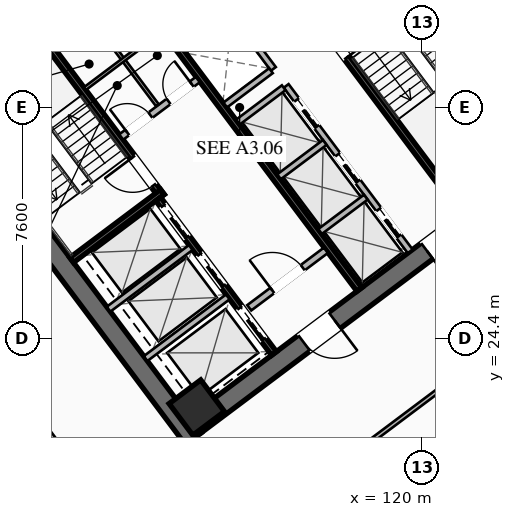
"""IFC4 building model, lengths in metres.
Left out: names, types, materials, properties, quantities, classifications, styles, units other than length and angle.
Written with IfcOpenShell. Run it as: python <this file> out.ifc"""

import sys

from ifc_helpers import new_model, si_unit, direction, frame, frame_2d, origin, origin_2d, place, context, subcontext, project, spatial, rectangle, hollow_rectangle, extrude, element, fill, save


model = new_model("IFC4")
c1 = context("Model", 3, precision=1e-05, world=origin(), true_north=direction((0.0, 1.0)))
c2 = subcontext(c1, "Body", "Model", "MODEL_VIEW")
j1 = project(units=[si_unit("LENGTHUNIT", "METRE"), si_unit("PLANEANGLEUNIT", "RADIAN")], contexts=[c1])
p1 = place(None, origin())
s1 = spatial("IfcSite", under=j1, at=p1, CompositionType="ELEMENT")
p2 = place(p1, origin())
s2 = spatial("IfcBuilding", under=s1, at=p2, CompositionType="ELEMENT")
p3 = place(p2, frame((0.0, 0.0, 102.7)))
s3 = spatial("IfcBuildingStorey", under=s2, at=p3, CompositionType="ELEMENT", Elevation=102.7)
for number, where, z_axis, x_axis in (
    (1, (112.476, 21.107, 0.0), (0.0, 0.0, 1.0), (-0.6, 0.8, 0.0)),
    (2, (115.524, 42.893, 0.0), (0.0, 0.0, 1.0), (0.6, -0.8, 0.0)),
):
    element("IfcWall", number, at=place(p3, frame(where, z_axis=z_axis, x_axis=x_axis)), inside=s3, PredefinedType="SHEAR", context=c2, shape_type="SweptSolid", body=[
        extrude(rectangle(XDim=15.6, YDim=0.65, at=frame_2d((7.8, 0.0))), origin(), (0.0, 0.0, 1.0), 3.55),
    ])
p4 = place(p3, frame((124.429, 30.478, 0.0), z_axis=(0.0, 0.0, 1.0), x_axis=(-0.799998028465, -0.600002628705, 0.0)))
e3 = element("IfcWall", 3, at=p4, inside=s3, PredefinedType="SHEAR", context=c2, shape_type="SweptSolid", body=[
    extrude(rectangle(XDim=14.86, YDim=0.65, at=frame_2d((7.43, 0.0))), origin(), (0.0, 0.0, 1.0), 3.55),
])
p5 = place(p4, frame((9.13, 0.0, 0.0)))
e4 = element("IfcOpeningElement", 4, at=p5, cuts=e3, PredefinedType="OPENING", context=c2, shape_type="SweptSolid", body=[
    extrude(rectangle(XDim=1.25, YDim=2.25, at=frame_2d((0.625, 1.125))), frame((0.0, 0.335, 0.0), z_axis=(0.0, -1.0, 0.0), x_axis=(1.0, 0.0, 0.0)), (0.0, 0.0, 1.0), 0.67),
])
p6 = place(p4, frame((4.08, 0.0, 0.0)))
e5 = element("IfcOpeningElement", 5, at=p6, cuts=e3, PredefinedType="OPENING", context=c2, shape_type="SweptSolid", body=[
    extrude(rectangle(XDim=1.25, YDim=2.25, at=frame_2d((0.625, 1.125))), frame((0.0, 0.335, 0.0), z_axis=(0.0, -1.0, 0.0), x_axis=(1.0, 0.0, 0.0)), (0.0, 0.0, 1.0), 0.67),
])
p7 = place(p3, frame((103.571, 33.522, 0.0), z_axis=(0.0, 0.0, 1.0), x_axis=(0.799998028465, 0.600002628705, 0.0)))
e6 = element("IfcWall", 6, at=p7, inside=s3, PredefinedType="SHEAR", context=c2, shape_type="SweptSolid", body=[
    extrude(rectangle(XDim=14.86, YDim=0.65, at=frame_2d((7.43, 0.0))), origin(), (0.0, 0.0, 1.0), 3.55),
])
p8 = place(p7, frame((4.48, 0.0, 0.0)))
e7 = element("IfcOpeningElement", 7, at=p8, cuts=e6, PredefinedType="OPENING", context=c2, shape_type="SweptSolid", body=[
    extrude(rectangle(XDim=1.25, YDim=2.25, at=frame_2d((0.625, 1.125))), frame((0.0, 0.335, 0.0), z_axis=(0.0, -1.0, 0.0), x_axis=(1.0, 0.0, 0.0)), (0.0, 0.0, 1.0), 0.67),
])
p9 = place(p7, frame((9.53, 0.0, 0.0)))
e8 = element("IfcOpeningElement", 8, at=p9, cuts=e6, PredefinedType="OPENING", context=c2, shape_type="SweptSolid", body=[
    extrude(rectangle(XDim=1.25, YDim=2.25, at=frame_2d((0.625, 1.125))), frame((0.0, 0.335, 0.0), z_axis=(0.0, -1.0, 0.0), x_axis=(1.0, 0.0, 0.0)), (0.0, 0.0, 1.0), 0.67),
])
p10 = place(p3, frame((112.59, 22.13, 0.0), z_axis=(0.0, 0.0, 1.0), x_axis=(0.799999996291, 0.600000004945, 0.0)))
e9 = element("IfcColumn", 9, at=p10, inside=s3, PredefinedType="COLUMN", context=c2, shape_type="SweptSolid", body=[
    extrude(hollow_rectangle(XDim=1.3, YDim=1.3, WallThickness=0.05, at=origin_2d()), origin(), (0.0, 0.0, 1.0), 3.35),
])
p11 = place(p3, frame((111.44, 29.08, 0.0), z_axis=(0.0, 0.0, 1.0), x_axis=(-0.600009827119, 0.799992629566, 0.0)))
e10 = element("IfcWall", 10, at=p11, inside=s3, PredefinedType="SHEAR", context=c2, shape_type="SweptSolid", body=[
    extrude(rectangle(XDim=7.95, YDim=0.2, at=frame_2d((3.975, 0.0))), origin(), (0.0, 0.0, 1.0), 3.35),
])
p12 = place(p11, frame((0.45, 0.0, 0.0)))
e11 = element("IfcOpeningElement", 11, at=p12, cuts=e10, PredefinedType="OPENING", context=c2, shape_type="SweptSolid", body=[
    extrude(rectangle(XDim=1.15, YDim=2.2, at=frame_2d((0.575, 1.1))), frame((0.0, 0.11, 0.0), z_axis=(0.0, -1.0, 0.0), x_axis=(1.0, 0.0, 0.0)), (0.0, 0.0, 1.0), 0.22),
])
p13 = place(p3, frame((108.476, 26.982, 0.0), z_axis=(0.0, 0.0, 1.0), x_axis=(0.799984290658, 0.600020945218, 0.0)))
e12 = element("IfcWall", 12, at=p13, inside=s3, PredefinedType="SHEAR", context=c2, shape_type="SweptSolid", body=[
    extrude(rectangle(XDim=3.73, YDim=0.2, at=frame_2d((1.865, 0.0))), origin(), (0.0, 0.0, 1.0), 3.35),
])
p14 = place(p3, frame((116.56, 34.92, 0.0), z_axis=(0.0, 0.0, 1.0), x_axis=(0.600009827119, -0.799992629566, 0.0)))
e13 = element("IfcWall", 13, at=p14, inside=s3, PredefinedType="SHEAR", context=c2, shape_type="SweptSolid", body=[
    extrude(rectangle(XDim=7.95, YDim=0.2, at=frame_2d((3.975, 0.0))), origin(), (0.0, 0.0, 1.0), 3.35),
])
p15 = place(p14, frame((0.45, 0.0, 0.0)))
e14 = element("IfcOpeningElement", 14, at=p15, cuts=e13, PredefinedType="OPENING", context=c2, shape_type="SweptSolid", body=[
    extrude(rectangle(XDim=1.15, YDim=2.2, at=frame_2d((0.575, 1.1))), frame((0.0, 0.11, 0.0), z_axis=(0.0, -1.0, 0.0), x_axis=(1.0, 0.0, 0.0)), (0.0, 0.0, 1.0), 0.22),
])
p16 = place(p3, frame((117.938, 26.016, 0.0), z_axis=(0.0, 0.0, 1.0), x_axis=(-0.600005463273, 0.799995902516, 0.0)))
e15 = element("IfcWall", 15, at=p16, inside=s3, PredefinedType="SHEAR", context=c2, shape_type="SweptSolid", body=[
    extrude(rectangle(XDim=14.3, YDim=0.2, at=frame_2d((7.15, 0.0))), origin(), (0.0, 0.0, 1.0), 3.35),
])
p17 = place(p3, frame((110.104, 31.028, 0.0), z_axis=(0.0, 0.0, 1.0), x_axis=(0.800018601094, 0.59997519774, 0.0)))
e16 = element("IfcWall", 16, at=p17, inside=s3, PredefinedType="SOLIDWALL", context=c2, shape_type="SweptSolid", body=[
    extrude(rectangle(XDim=3.15, YDim=0.22, at=frame_2d((1.575, 0.0))), origin(), (0.0, 0.0, 1.0), 2.703),
])
p18 = place(p17, frame((0.25, 0.0, 0.0)))
e17 = element("IfcOpeningElement", 17, at=p18, cuts=e16, PredefinedType="OPENING", context=c2, shape_type="SweptSolid", body=[
    extrude(rectangle(XDim=0.95, YDim=2.05, at=frame_2d((0.475, 1.025))), frame((0.0, 0.12, 0.0), z_axis=(0.0, -1.0, 0.0), x_axis=(1.0, 0.0, 0.0)), (0.0, 0.0, 1.0), 0.24),
])
p19 = place(p17, frame((1.95, 0.0, 0.0)))
e18 = element("IfcOpeningElement", 18, at=p19, cuts=e16, PredefinedType="OPENING", context=c2, shape_type="SweptSolid", body=[
    extrude(rectangle(XDim=0.95, YDim=2.05, at=frame_2d((0.475, 1.025))), frame((0.0, 0.12, 0.0), z_axis=(0.0, -1.0, 0.0), x_axis=(1.0, 0.0, 0.0)), (0.0, 0.0, 1.0), 0.24),
])
p20 = place(p3, frame((114.316, 25.412, 0.0), z_axis=(0.0, 0.0, 1.0), x_axis=(0.800018601094, 0.59997519774, 0.0)))
e19 = element("IfcWall", 19, at=p20, inside=s3, PredefinedType="SOLIDWALL", context=c2, shape_type="SweptSolid", body=[
    extrude(rectangle(XDim=3.15, YDim=0.22, at=frame_2d((1.575, 0.0))), origin(), (0.0, 0.0, 1.0), 2.703),
])
p21 = place(p20, frame((0.95, 0.0, 0.0)))
e20 = element("IfcOpeningElement", 20, at=p21, cuts=e19, PredefinedType="OPENING", context=c2, shape_type="SweptSolid", body=[
    extrude(rectangle(XDim=1.25, YDim=2.25, at=frame_2d((0.625, 1.125))), frame((0.0, 0.12, 0.0), z_axis=(0.0, -1.0, 0.0), x_axis=(1.0, 0.0, 0.0)), (0.0, 0.0, 1.0), 0.24),
])
p22 = place(p3, frame((115.13, 23.91, 0.0), z_axis=(0.0, 0.0, 1.0), x_axis=(-0.599975393228, 0.800018454488, 0.0)))
e21 = element("IfcWall", 21, at=p22, inside=s3, PredefinedType="SHEAR", context=c2, shape_type="SweptSolid", body=[
    extrude(rectangle(XDim=6.35, YDim=0.2, at=frame_2d((3.175, 0.0))), origin(), (0.0, 0.0, 1.0), 3.35),
])
p23 = place(p22, frame((4.775, 0.0, 0.0)))
e22 = element("IfcOpeningElement", 22, at=p23, cuts=e21, PredefinedType="OPENING", context=c2, shape_type="SweptSolid", body=[
    extrude(rectangle(XDim=1.3, YDim=2.25, at=frame_2d((0.65, 1.125))), frame((0.0, 0.11, 0.0), z_axis=(0.0, -1.0, 0.0), x_axis=(1.0, 0.0, 0.0)), (0.0, 0.0, 1.0), 0.22),
])
p24 = place(p22, frame((2.775, 0.0, 0.0)))
e23 = element("IfcOpeningElement", 23, at=p24, cuts=e21, PredefinedType="OPENING", context=c2, shape_type="SweptSolid", body=[
    extrude(rectangle(XDim=1.3, YDim=2.25, at=frame_2d((0.65, 1.125))), frame((0.0, 0.11, 0.0), z_axis=(0.0, -1.0, 0.0), x_axis=(1.0, 0.0, 0.0)), (0.0, 0.0, 1.0), 0.22),
])
p25 = place(p22, frame((0.575, 0.0, 0.0)))
e24 = element("IfcOpeningElement", 24, at=p25, cuts=e21, PredefinedType="OPENING", context=c2, shape_type="SweptSolid", body=[
    extrude(rectangle(XDim=1.3, YDim=2.25, at=frame_2d((0.65, 1.125))), frame((0.0, 0.11, 0.0), z_axis=(0.0, -1.0, 0.0), x_axis=(1.0, 0.0, 0.0)), (0.0, 0.0, 1.0), 0.22),
])
for number, where, z_axis, x_axis in (
    (25, (110.906, 23.742, 0.0), (0.0, 0.0, 1.0), (0.8, 0.6, 0.0)),
    (26, (109.688, 25.366, 0.0), (0.0, 0.0, 1.0), (0.8, 0.6, 0.0)),
):
    element("IfcWall", number, at=place(p3, frame(where, z_axis=z_axis, x_axis=x_axis)), inside=s3, PredefinedType="SOLIDWALL", context=c2, shape_type="SweptSolid", body=[
        extrude(rectangle(XDim=3.38, YDim=0.2, at=frame_2d((1.69, 0.0))), origin(), (0.0, 0.0, 1.0), 3.35),
    ])
p26 = place(p3, frame((111.296, 32.072, 0.0), z_axis=(0.0, 0.0, 1.0), x_axis=(-0.59995887973, 0.800030838552, 0.0)))
e27 = element("IfcWall", 27, at=p26, inside=s3, PredefinedType="PARTITIONING", context=c2, shape_type="SweptSolid", body=[
    extrude(rectangle(XDim=3.8, YDim=0.11, at=frame_2d((1.9, 0.0))), origin(), (0.0, 0.0, 1.0), 2.703),
])
p27 = place(p3, frame((108.91, 32.62, 0.0), z_axis=(0.0, 0.0, 1.0), x_axis=(0.800018601094, 0.59997519774, 0.0)))
e28 = element("IfcWall", 28, at=p27, inside=s3, PredefinedType="PARTITIONING", context=c2, shape_type="SweptSolid", body=[
    extrude(rectangle(XDim=3.15, YDim=0.11, at=frame_2d((1.575, 0.0))), origin(), (0.0, 0.0, 1.0), 2.703),
])
p28 = place(p3, frame((119.61, 27.27, 0.0), z_axis=(0.0, 0.0, 1.0), x_axis=(-0.600011488909, 0.79999138319, 0.0)))
e29 = element("IfcWall", 29, at=p28, inside=s3, PredefinedType="SOLIDWALL", context=c2, shape_type="SweptSolid", body=[
    extrude(rectangle(XDim=6.8, YDim=0.2, at=frame_2d((3.4, 0.0))), origin(), (0.0, 0.0, 1.0), 3.35),
])
p29 = place(p28, frame((0.625, 0.0, 0.0)))
e30 = element("IfcOpeningElement", 30, at=p29, cuts=e29, PredefinedType="OPENING", context=c2, shape_type="SweptSolid", body=[
    extrude(rectangle(XDim=1.1, YDim=2.2, at=frame_2d((0.55, 1.1))), frame((0.0, 0.11, 0.0), z_axis=(0.0, -1.0, 0.0), x_axis=(1.0, 0.0, 0.0)), (0.0, 0.0, 1.0), 0.22),
])
p30 = place(p28, frame((2.875, 0.0, 0.0)))
e31 = element("IfcOpeningElement", 31, at=p30, cuts=e29, PredefinedType="OPENING", context=c2, shape_type="SweptSolid", body=[
    extrude(rectangle(XDim=1.1, YDim=2.2, at=frame_2d((0.55, 1.1))), frame((0.0, 0.11, 0.0), z_axis=(0.0, -1.0, 0.0), x_axis=(1.0, 0.0, 0.0)), (0.0, 0.0, 1.0), 0.22),
])
p31 = place(p28, frame((5.125, 0.0, 0.0)))
e32 = element("IfcOpeningElement", 32, at=p31, cuts=e29, PredefinedType="OPENING", context=c2, shape_type="SweptSolid", body=[
    extrude(rectangle(XDim=1.1, YDim=2.2, at=frame_2d((0.55, 1.1))), frame((0.0, 0.11, 0.0), z_axis=(0.0, -1.0, 0.0), x_axis=(1.0, 0.0, 0.0)), (0.0, 0.0, 1.0), 0.22),
])
p32 = place(p3, frame((116.646, 27.922, 0.0), z_axis=(0.0, 0.0, 1.0), x_axis=(0.8, 0.6, 0.0)))
e33 = element("IfcWall", 33, at=p32, inside=s3, PredefinedType="SOLIDWALL", context=c2, shape_type="SweptSolid", body=[
    extrude(rectangle(XDim=1.88, YDim=0.2, at=frame_2d((0.94, 0.0))), origin(), (0.0, 0.0, 1.0), 3.35),
])
p33 = place(p3, frame((115.296, 29.722, 0.0), z_axis=(0.0, 0.0, 1.0), x_axis=(0.799984418148, 0.600020775241, 0.0)))
e34 = element("IfcWall", 34, at=p33, inside=s3, PredefinedType="SOLIDWALL", context=c2, shape_type="SweptSolid", body=[
    extrude(rectangle(XDim=1.88, YDim=0.2, at=frame_2d((0.94, 0.0))), origin(), (0.0, 0.0, 1.0), 3.35),
])
p34 = place(p3, frame((113.946, 31.522, 0.0), z_axis=(0.0, 0.0, 1.0), x_axis=(0.8, 0.6, 0.0)))
e35 = element("IfcWall", 35, at=p34, inside=s3, PredefinedType="SOLIDWALL", context=c2, shape_type="SweptSolid", body=[
    extrude(rectangle(XDim=1.88, YDim=0.2, at=frame_2d((0.94, 0.0))), origin(), (0.0, 0.0, 1.0), 3.35),
])
p35 = place(p3, frame((115.11, 33.27, 0.0), z_axis=(0.0, 0.0, 1.0), x_axis=(-0.600011488909, 0.79999138319, 0.0)))
e36 = element("IfcWall", 36, at=p35, inside=s3, PredefinedType="SOLIDWALL", context=c2, shape_type="SweptSolid", body=[
    extrude(rectangle(XDim=6.8, YDim=0.2, at=frame_2d((3.4, 0.0))), origin(), (0.0, 0.0, 1.0), 3.35),
])
p36 = place(p3, frame((113.526, 32.082, 0.0), z_axis=(0.0, 0.0, 1.0), x_axis=(0.800046745961, 0.599937666993, 0.0)))
e37 = element("IfcWall", 37, at=p36, inside=s3, PredefinedType="SOLIDWALL", context=c2, shape_type="SweptSolid", body=[
    extrude(rectangle(XDim=1.88, YDim=0.2, at=frame_2d((0.94, 0.0))), origin(), (0.0, 0.0, 1.0), 3.35),
])
p37 = place(p3, frame((112.176, 33.882, 0.0), z_axis=(0.0, 0.0, 1.0), x_axis=(0.8, 0.6, 0.0)))
e38 = element("IfcWall", 38, at=p37, inside=s3, PredefinedType="SOLIDWALL", context=c2, shape_type="SweptSolid", body=[
    extrude(rectangle(XDim=1.88, YDim=0.2, at=frame_2d((0.94, 0.0))), origin(), (0.0, 0.0, 1.0), 3.35),
])
p38 = place(p3, frame((98.316, 33.862, 0.0), z_axis=(0.0, 0.0, 1.0), x_axis=(0.8000041147, 0.599994513695, 0.0)))
e39 = element("IfcWall", 39, at=p38, inside=s3, PredefinedType="PARTITIONING", context=c2, shape_type="SweptSolid", body=[
    extrude(rectangle(XDim=28.48, YDim=0.135, at=frame_2d((14.24, 0.0))), origin(), (0.0, 0.0, 1.0), 2.703),
])
p39 = place(p38, frame((0.3, 0.0, 0.0)))
e40 = element("IfcOpeningElement", 40, at=p39, cuts=e39, PredefinedType="OPENING", context=c2, shape_type="SweptSolid", body=[
    extrude(rectangle(XDim=0.95, YDim=2.05, at=frame_2d((0.475, 1.025))), frame((0.0, 0.077, 0.0), z_axis=(0.0, -1.0, 0.0), x_axis=(1.0, 0.0, 0.0)), (0.0, 0.0, 1.0), 0.155),
])
p40 = place(p38, frame((10.9, 0.0, 0.0)))
e41 = element("IfcOpeningElement", 41, at=p40, cuts=e39, PredefinedType="OPENING", context=c2, shape_type="SweptSolid", body=[
    extrude(rectangle(XDim=0.95, YDim=2.05, at=frame_2d((0.475, 1.025))), frame((0.0, 0.077, 0.0), z_axis=(0.0, -1.0, 0.0), x_axis=(1.0, 0.0, 0.0)), (0.0, 0.0, 1.0), 0.155),
])
p41 = place(p38, frame((14.9, 0.0, 0.0)))
e42 = element("IfcOpeningElement", 42, at=p41, cuts=e39, PredefinedType="OPENING", context=c2, shape_type="SweptSolid", body=[
    extrude(rectangle(XDim=0.95, YDim=2.05, at=frame_2d((0.475, 1.025))), frame((0.0, 0.077, 0.0), z_axis=(0.0, -1.0, 0.0), x_axis=(1.0, 0.0, 0.0)), (0.0, 0.0, 1.0), 0.155),
])
p42 = place(p38, frame((27.23, 0.0, 0.0)))
e43 = element("IfcOpeningElement", 43, at=p42, cuts=e39, PredefinedType="OPENING", context=c2, shape_type="SweptSolid", body=[
    extrude(rectangle(XDim=0.95, YDim=2.05, at=frame_2d((0.475, 1.025))), frame((0.0, 0.077, 0.0), z_axis=(0.0, -1.0, 0.0), x_axis=(1.0, 0.0, 0.0)), (0.0, 0.0, 1.0), 0.155),
])
p43 = place(p3, frame((134.462, 33.134, 0.0), z_axis=(0.0, 0.0, 1.0), x_axis=(-0.799996913945, -0.600004114717, 0.0)))
e44 = element("IfcWall", 44, at=p43, inside=s3, PredefinedType="PARTITIONING", context=c2, shape_type="SweptSolid", body=[
    extrude(rectangle(XDim=28.48, YDim=0.135, at=frame_2d((14.24, 0.0))), origin(), (0.0, 0.0, 1.0), 2.703),
])
p44 = place(p43, frame((27.15, 0.0, 0.0)))
e45 = element("IfcOpeningElement", 45, at=p44, cuts=e44, PredefinedType="OPENING", context=c2, shape_type="SweptSolid", body=[
    extrude(rectangle(XDim=0.95, YDim=2.05, at=frame_2d((0.475, 1.025))), frame((0.0, 0.077, 0.0), z_axis=(0.0, -1.0, 0.0), x_axis=(1.0, 0.0, 0.0)), (0.0, 0.0, 1.0), 0.155),
])
p45 = place(p43, frame((16.321, 0.0, 0.0)))
e46 = element("IfcOpeningElement", 46, at=p45, cuts=e44, PredefinedType="OPENING", context=c2, shape_type="SweptSolid", body=[
    extrude(rectangle(XDim=0.95, YDim=2.05, at=frame_2d((0.475, 1.025))), frame((0.0, 0.077, 0.0), z_axis=(0.0, -1.0, 0.0), x_axis=(1.0, 0.0, 0.0)), (0.0, 0.0, 1.0), 0.155),
])
p46 = place(p43, frame((12.529, 0.0, 0.0)))
e47 = element("IfcOpeningElement", 47, at=p46, cuts=e44, PredefinedType="OPENING", context=c2, shape_type="SweptSolid", body=[
    extrude(rectangle(XDim=0.95, YDim=2.05, at=frame_2d((0.475, 1.025))), frame((0.0, 0.077, 0.0), z_axis=(0.0, -1.0, 0.0), x_axis=(1.0, 0.0, 0.0)), (0.0, 0.0, 1.0), 0.155),
])
p47 = place(p43, frame((0.38, 0.0, 0.0)))
e48 = element("IfcOpeningElement", 48, at=p47, cuts=e44, PredefinedType="OPENING", context=c2, shape_type="SweptSolid", body=[
    extrude(rectangle(XDim=0.95, YDim=2.05, at=frame_2d((0.475, 1.025))), frame((0.0, 0.077, 0.0), z_axis=(0.0, -1.0, 0.0), x_axis=(1.0, 0.0, 0.0)), (0.0, 0.0, 1.0), 0.155),
])
p48 = place(p3, frame((111.63, 16.11, 0.0), z_axis=(0.0, 0.0, 1.0), x_axis=(-0.599996466511, 0.800002650104, 0.0)))
e49 = element("IfcWall", 49, at=p48, inside=s3, PredefinedType="PARTITIONING", context=c2, shape_type="SweptSolid", body=[
    extrude(rectangle(XDim=22.11, YDim=0.135, at=frame_2d((11.055, 0.0))), origin(), (0.0, 0.0, 1.0), 2.703),
])
p49 = place(p48, frame((0.3, 0.0, 0.0)))
e50 = element("IfcOpeningElement", 50, at=p49, cuts=e49, PredefinedType="OPENING", context=c2, shape_type="SweptSolid", body=[
    extrude(rectangle(XDim=0.95, YDim=2.05, at=frame_2d((0.475, 1.025))), frame((0.0, 0.077, 0.0), z_axis=(0.0, -1.0, 0.0), x_axis=(1.0, 0.0, 0.0)), (0.0, 0.0, 1.0), 0.155),
])
p50 = place(p5, origin())
e51 = element("IfcDoor", 51, at=p50, inside=s3, OperationType="SINGLE_SWING_LEFT", PredefinedType="DOOR", context=c2, shape_type="SweptSolid", body=[
    extrude(rectangle(XDim=1.25, YDim=2.25, at=frame_2d((0.625, 1.125))), frame((0.0, 0.025, 0.0), z_axis=(0.0, -1.0, 0.0), x_axis=(1.0, 0.0, 0.0)), (0.0, 0.0, 1.0), 0.05),
])
fill(e4, e51)
p51 = place(p6, origin())
e52 = element("IfcDoor", 52, at=p51, inside=s3, OperationType="SINGLE_SWING_RIGHT", PredefinedType="DOOR", context=c2, shape_type="SweptSolid", body=[
    extrude(rectangle(XDim=1.25, YDim=2.25, at=frame_2d((0.625, 1.125))), frame((0.0, 0.025, 0.0), z_axis=(0.0, -1.0, 0.0), x_axis=(1.0, 0.0, 0.0)), (0.0, 0.0, 1.0), 0.05),
])
fill(e5, e52)
p52 = place(p12, origin())
e53 = element("IfcDoor", 53, at=p52, inside=s3, OperationType="SINGLE_SWING_RIGHT", PredefinedType="DOOR", context=c2, shape_type="SweptSolid", body=[
    extrude(rectangle(XDim=1.15, YDim=2.2, at=frame_2d((0.575, 1.1))), frame((0.0, 0.025, 0.0), z_axis=(0.0, -1.0, 0.0), x_axis=(1.0, 0.0, 0.0)), (0.0, 0.0, 1.0), 0.05),
])
fill(e11, e53)
p53 = place(p15, origin())
e54 = element("IfcDoor", 54, at=p53, inside=s3, OperationType="SINGLE_SWING_RIGHT", PredefinedType="DOOR", context=c2, shape_type="SweptSolid", body=[
    extrude(rectangle(XDim=1.15, YDim=2.2, at=frame_2d((0.575, 1.1))), frame((0.0, 0.025, 0.0), z_axis=(0.0, -1.0, 0.0), x_axis=(1.0, 0.0, 0.0)), (0.0, 0.0, 1.0), 0.05),
])
fill(e14, e54)
p54 = place(p21, origin())
e55 = element("IfcDoor", 55, at=p54, inside=s3, OperationType="SINGLE_SWING_LEFT", PredefinedType="DOOR", context=c2, shape_type="SweptSolid", body=[
    extrude(rectangle(XDim=1.25, YDim=2.25, at=frame_2d((0.625, 1.125))), frame((0.0, 0.025, 0.0), z_axis=(0.0, -1.0, 0.0), x_axis=(1.0, 0.0, 0.0)), (0.0, 0.0, 1.0), 0.05),
])
fill(e20, e55)
p55 = place(p18, origin())
e56 = element("IfcDoor", 56, at=p55, inside=s3, OperationType="SINGLE_SWING_LEFT", PredefinedType="DOOR", context=c2, shape_type="SweptSolid", body=[
    extrude(rectangle(XDim=0.95, YDim=2.05, at=frame_2d((0.475, 1.025))), frame((0.0, 0.025, 0.0), z_axis=(0.0, -1.0, 0.0), x_axis=(1.0, 0.0, 0.0)), (0.0, 0.0, 1.0), 0.05),
])
fill(e17, e56)
p56 = place(p19, origin())
e57 = element("IfcDoor", 57, at=p56, inside=s3, OperationType="SINGLE_SWING_RIGHT", PredefinedType="DOOR", context=c2, shape_type="SweptSolid", body=[
    extrude(rectangle(XDim=0.95, YDim=2.05, at=frame_2d((0.475, 1.025))), frame((0.0, 0.025, 0.0), z_axis=(0.0, -1.0, 0.0), x_axis=(1.0, 0.0, 0.0)), (0.0, 0.0, 1.0), 0.05),
])
fill(e18, e57)
p57 = place(p23, origin())
e58 = element("IfcDoor", 58, at=p57, inside=s3, OperationType="SLIDING_TO_LEFT", PredefinedType="DOOR", context=c2, shape_type="SweptSolid", body=[
    extrude(rectangle(XDim=1.3, YDim=2.25, at=frame_2d((0.65, 1.125))), frame((0.0, 0.025, 0.0), z_axis=(0.0, -1.0, 0.0), x_axis=(1.0, 0.0, 0.0)), (0.0, 0.0, 1.0), 0.05),
])
fill(e22, e58)
p58 = place(p24, origin())
e59 = element("IfcDoor", 59, at=p58, inside=s3, OperationType="SLIDING_TO_LEFT", PredefinedType="DOOR", context=c2, shape_type="SweptSolid", body=[
    extrude(rectangle(XDim=1.3, YDim=2.25, at=frame_2d((0.65, 1.125))), frame((0.0, 0.025, 0.0), z_axis=(0.0, -1.0, 0.0), x_axis=(1.0, 0.0, 0.0)), (0.0, 0.0, 1.0), 0.05),
])
fill(e23, e59)
p59 = place(p25, origin())
e60 = element("IfcDoor", 60, at=p59, inside=s3, OperationType="SLIDING_TO_LEFT", PredefinedType="DOOR", context=c2, shape_type="SweptSolid", body=[
    extrude(rectangle(XDim=1.3, YDim=2.25, at=frame_2d((0.65, 1.125))), frame((0.0, 0.025, 0.0), z_axis=(0.0, -1.0, 0.0), x_axis=(1.0, 0.0, 0.0)), (0.0, 0.0, 1.0), 0.05),
])
fill(e24, e60)
p60 = place(p29, origin())
e61 = element("IfcDoor", 61, at=p60, inside=s3, OperationType="SLIDING_TO_LEFT", PredefinedType="DOOR", context=c2, shape_type="SweptSolid", body=[
    extrude(rectangle(XDim=1.1, YDim=2.2, at=frame_2d((0.55, 1.1))), frame((0.0, 0.025, 0.0), z_axis=(0.0, -1.0, 0.0), x_axis=(1.0, 0.0, 0.0)), (0.0, 0.0, 1.0), 0.05),
])
fill(e30, e61)
p61 = place(p30, origin())
e62 = element("IfcDoor", 62, at=p61, inside=s3, OperationType="SLIDING_TO_LEFT", PredefinedType="DOOR", context=c2, shape_type="SweptSolid", body=[
    extrude(rectangle(XDim=1.1, YDim=2.2, at=frame_2d((0.55, 1.1))), frame((0.0, 0.025, 0.0), z_axis=(0.0, -1.0, 0.0), x_axis=(1.0, 0.0, 0.0)), (0.0, 0.0, 1.0), 0.05),
])
fill(e31, e62)
p62 = place(p31, origin())
e63 = element("IfcDoor", 63, at=p62, inside=s3, OperationType="SLIDING_TO_LEFT", PredefinedType="DOOR", context=c2, shape_type="SweptSolid", body=[
    extrude(rectangle(XDim=1.1, YDim=2.2, at=frame_2d((0.55, 1.1))), frame((0.0, 0.025, 0.0), z_axis=(0.0, -1.0, 0.0), x_axis=(1.0, 0.0, 0.0)), (0.0, 0.0, 1.0), 0.05),
])
fill(e32, e63)
save(model, sys.argv[1])
